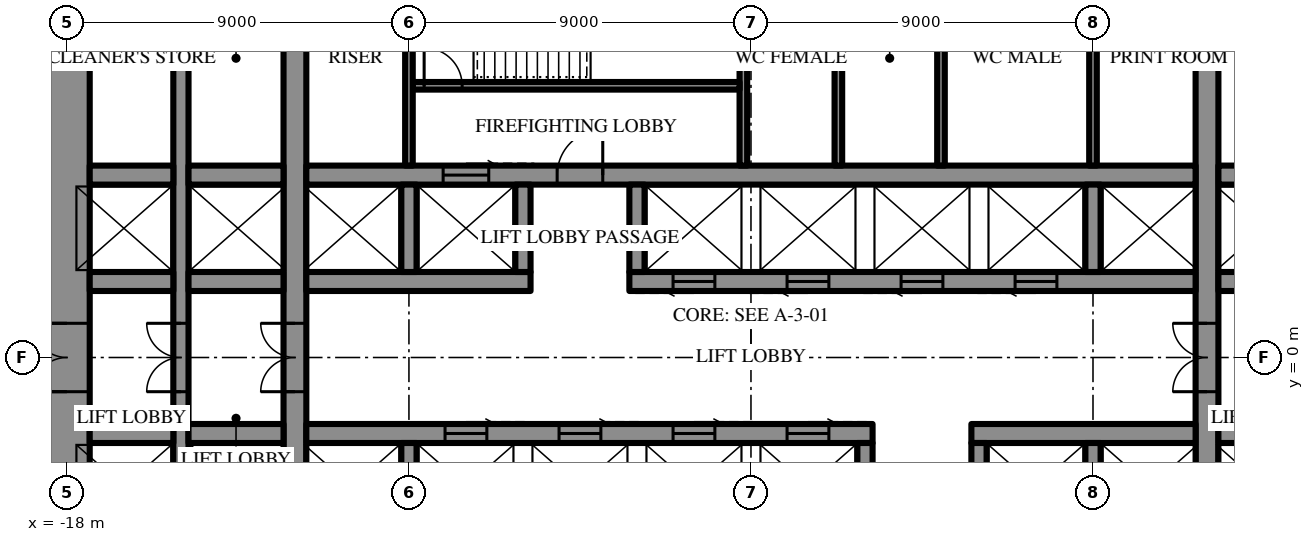
"""IFC4 building model, lengths in metres.
Left out: names, types, materials, properties, quantities, classifications, styles, units other than length and angle.
Written with IfcOpenShell. Run it as: python <this file> out.ifc"""

import sys

from ifc_helpers import new_model, si_unit, direction, frame, frame_2d, origin, place, context, subcontext, project, spatial, rectangle, extrude, element, fill, save


model = new_model("IFC4")
c1 = context("Model", 3, precision=1e-05, world=origin(), true_north=direction((0.0, 1.0)))
c2 = subcontext(c1, "Body", "Model", "MODEL_VIEW")
j1 = project(units=[si_unit("LENGTHUNIT", "METRE"), si_unit("PLANEANGLEUNIT", "RADIAN")], contexts=[c1])
p1 = place(None, origin())
s1 = spatial("IfcSite", under=j1, at=p1, CompositionType="ELEMENT")
p2 = place(p1, origin())
s2 = spatial("IfcBuilding", under=s1, at=p2, CompositionType="ELEMENT")
p3 = place(p2, frame((0.0, 0.0, 90.7)))
s3 = spatial("IfcBuildingStorey", under=s2, at=p3, CompositionType="ELEMENT", Elevation=90.7)
p4 = place(p3, frame((-18.0, 10.7, 0.0), z_axis=(0.0, 0.0, 1.0), x_axis=(0.0, -1.0, 0.0)))
e1 = element("IfcWall", 1, at=p4, inside=s3, PredefinedType="SHEAR", context=c2, shape_type="SweptSolid", body=[
    extrude(rectangle(XDim=21.4, YDim=1.2, at=frame_2d((10.7, 0.0))), origin(), (0.0, 0.0, 1.0), 4.2),
])
p5 = place(p4, frame((9.8, 0.0, 0.0)))
e2 = element("IfcOpeningElement", 2, at=p5, cuts=e1, PredefinedType="OPENING", context=c2, shape_type="SweptSolid", body=[
    extrude(rectangle(XDim=1.8, YDim=2.4, at=frame_2d((0.9, 1.2))), frame((0.0, 0.61, 0.0), z_axis=(0.0, -1.0, 0.0), x_axis=(1.0, 0.0, 0.0)), (0.0, 0.0, 1.0), 1.22),
])
p6 = place(p3, frame((12.0, -10.7, 0.0), z_axis=(0.0, 0.0, 1.0), x_axis=(0.0, 1.0, 0.0)))
e3 = element("IfcWall", 3, at=p6, inside=s3, PredefinedType="SHEAR", context=c2, shape_type="SweptSolid", body=[
    extrude(rectangle(XDim=21.4, YDim=0.6, at=frame_2d((10.7, 0.0))), origin(), (0.0, 0.0, 1.0), 4.2),
])
p7 = place(p6, frame((9.8, 0.0, 0.0)))
e4 = element("IfcOpeningElement", 4, at=p7, cuts=e3, PredefinedType="OPENING", context=c2, shape_type="SweptSolid", body=[
    extrude(rectangle(XDim=1.8, YDim=2.4, at=frame_2d((0.9, 1.2))), frame((0.0, 0.31, 0.0), z_axis=(0.0, -1.0, 0.0), x_axis=(1.0, 0.0, 0.0)), (0.0, 0.0, 1.0), 0.62),
])
p8 = place(p3, frame((-12.0, -10.7, 0.0), z_axis=(0.0, 0.0, 1.0), x_axis=(0.0, 1.0, 0.0)))
e5 = element("IfcWall", 5, at=p8, inside=s3, PredefinedType="SHEAR", context=c2, shape_type="SweptSolid", body=[
    extrude(rectangle(XDim=21.4, YDim=0.6, at=frame_2d((10.7, 0.0))), origin(), (0.0, 0.0, 1.0), 4.2),
])
p9 = place(p8, frame((9.8, 0.0, 0.0)))
e6 = element("IfcOpeningElement", 6, at=p9, cuts=e5, PredefinedType="OPENING", context=c2, shape_type="SweptSolid", body=[
    extrude(rectangle(XDim=1.8, YDim=2.4, at=frame_2d((0.9, 1.2))), frame((0.0, 0.31, 0.0), z_axis=(0.0, -1.0, 0.0), x_axis=(1.0, 0.0, 0.0)), (0.0, 0.0, 1.0), 0.62),
])
p10 = place(p3, frame((-15.0, -10.7, 0.0), z_axis=(0.0, 0.0, 1.0), x_axis=(0.0, 1.0, 0.0)))
e7 = element("IfcWall", 7, at=p10, inside=s3, PredefinedType="SHEAR", context=c2, shape_type="SweptSolid", body=[
    extrude(rectangle(XDim=21.4, YDim=0.4, at=frame_2d((10.7, 0.0))), origin(), (0.0, 0.0, 1.0), 4.2),
])
p11 = place(p10, frame((9.8, 0.0, 0.0)))
e8 = element("IfcOpeningElement", 8, at=p11, cuts=e7, PredefinedType="OPENING", context=c2, shape_type="SweptSolid", body=[
    extrude(rectangle(XDim=1.8, YDim=2.4, at=frame_2d((0.9, 1.2))), frame((0.0, 0.21, 0.0), z_axis=(0.0, -1.0, 0.0), x_axis=(1.0, 0.0, 0.0)), (0.0, 0.0, 1.0), 0.42),
])
p12 = place(p3, frame((-17.4, 2.0, 0.0), z_axis=(0.0, 0.0, 1.0), x_axis=(1.0, 0.0, 0.0)))
e9 = element("IfcWall", 9, at=p12, inside=s3, PredefinedType="SHEAR", context=c2, shape_type="SweptSolid", body=[
    extrude(rectangle(XDim=2.2, YDim=0.5, at=frame_2d((1.1, 0.0))), origin(), (0.0, 0.0, 1.0), 4.2),
])
p13 = place(p3, frame((-14.8, 2.0, 0.0), z_axis=(0.0, 0.0, 1.0), x_axis=(1.0, 0.0, 0.0)))
e10 = element("IfcWall", 10, at=p13, inside=s3, PredefinedType="SHEAR", context=c2, shape_type="SweptSolid", body=[
    extrude(rectangle(XDim=2.5, YDim=0.5, at=frame_2d((1.25, 0.0))), origin(), (0.0, 0.0, 1.0), 4.2),
])
p14 = place(p3, frame((-11.7, 2.0, 0.0), z_axis=(0.0, 0.0, 1.0), x_axis=(1.0, 0.0, 0.0)))
e11 = element("IfcWall", 11, at=p14, inside=s3, PredefinedType="SHEAR", context=c2, shape_type="SweptSolid", body=[
    extrude(rectangle(XDim=5.9, YDim=0.5, at=frame_2d((2.95, 0.0))), origin(), (0.0, 0.0, 1.0), 4.2),
])
p15 = place(p3, frame((-3.2, 2.0, 0.0), z_axis=(0.0, 0.0, 1.0), x_axis=(1.0, 0.0, 0.0)))
e12 = element("IfcWall", 12, at=p15, inside=s3, PredefinedType="SHEAR", context=c2, shape_type="SweptSolid", body=[
    extrude(rectangle(XDim=14.9, YDim=0.5, at=frame_2d((7.45, 0.0))), origin(), (0.0, 0.0, 1.0), 4.2),
])
p16 = place(p15, frame((1.15, 0.0, 0.0)))
e13 = element("IfcOpeningElement", 13, at=p16, cuts=e12, PredefinedType="OPENING", context=c2, shape_type="SweptSolid", body=[
    extrude(rectangle(XDim=1.1, YDim=2.2, at=frame_2d((0.55, 1.1))), frame((0.0, 0.26, 0.0), z_axis=(0.0, -1.0, 0.0), x_axis=(1.0, 0.0, 0.0)), (0.0, 0.0, 1.0), 0.52),
])
p17 = place(p15, frame((4.15, 0.0, 0.0)))
e14 = element("IfcOpeningElement", 14, at=p17, cuts=e12, PredefinedType="OPENING", context=c2, shape_type="SweptSolid", body=[
    extrude(rectangle(XDim=1.1, YDim=2.2, at=frame_2d((0.55, 1.1))), frame((0.0, 0.26, 0.0), z_axis=(0.0, -1.0, 0.0), x_axis=(1.0, 0.0, 0.0)), (0.0, 0.0, 1.0), 0.52),
])
p18 = place(p15, frame((7.15, 0.0, 0.0)))
e15 = element("IfcOpeningElement", 15, at=p18, cuts=e12, PredefinedType="OPENING", context=c2, shape_type="SweptSolid", body=[
    extrude(rectangle(XDim=1.1, YDim=2.2, at=frame_2d((0.55, 1.1))), frame((0.0, 0.26, 0.0), z_axis=(0.0, -1.0, 0.0), x_axis=(1.0, 0.0, 0.0)), (0.0, 0.0, 1.0), 0.52),
])
p19 = place(p15, frame((10.15, 0.0, 0.0)))
e16 = element("IfcOpeningElement", 16, at=p19, cuts=e12, PredefinedType="OPENING", context=c2, shape_type="SweptSolid", body=[
    extrude(rectangle(XDim=1.1, YDim=2.2, at=frame_2d((0.55, 1.1))), frame((0.0, 0.26, 0.0), z_axis=(0.0, -1.0, 0.0), x_axis=(1.0, 0.0, 0.0)), (0.0, 0.0, 1.0), 0.52),
])
p20 = place(p3, frame((12.3, 2.0, 0.0), z_axis=(0.0, 0.0, 1.0), x_axis=(1.0, 0.0, 0.0)))
e17 = element("IfcWall", 17, at=p20, inside=s3, PredefinedType="SHEAR", context=c2, shape_type="SweptSolid", body=[
    extrude(rectangle(XDim=2.5, YDim=0.5, at=frame_2d((1.25, 0.0))), origin(), (0.0, 0.0, 1.0), 4.2),
])
p21 = place(p3, frame((-17.4, 4.8, 0.0), z_axis=(0.0, 0.0, 1.0), x_axis=(1.0, 0.0, 0.0)))
e18 = element("IfcWall", 18, at=p21, inside=s3, PredefinedType="SHEAR", context=c2, shape_type="SweptSolid", body=[
    extrude(rectangle(XDim=2.2, YDim=0.5, at=frame_2d((1.1, 0.0))), origin(), (0.0, 0.0, 1.0), 4.2),
])
p22 = place(p3, frame((-14.8, 4.8, 0.0), z_axis=(0.0, 0.0, 1.0), x_axis=(1.0, 0.0, 0.0)))
e19 = element("IfcWall", 19, at=p22, inside=s3, PredefinedType="SHEAR", context=c2, shape_type="SweptSolid", body=[
    extrude(rectangle(XDim=2.5, YDim=0.5, at=frame_2d((1.25, 0.0))), origin(), (0.0, 0.0, 1.0), 4.2),
])
p23 = place(p3, frame((-11.7, 4.8, 0.0), z_axis=(0.0, 0.0, 1.0), x_axis=(1.0, 0.0, 0.0)))
e20 = element("IfcWall", 20, at=p23, inside=s3, PredefinedType="SHEAR", context=c2, shape_type="SweptSolid", body=[
    extrude(rectangle(XDim=23.4, YDim=0.5, at=frame_2d((11.7, 0.0))), origin(), (0.0, 0.0, 1.0), 4.2),
])
p24 = place(p23, frame((6.6, 0.0, 0.0)))
e21 = element("IfcOpeningElement", 21, at=p24, cuts=e20, PredefinedType="OPENING", context=c2, shape_type="SweptSolid", body=[
    extrude(rectangle(XDim=1.2, YDim=2.2, at=frame_2d((0.6, 1.1))), frame((0.0, 0.26, 0.0), z_axis=(0.0, -1.0, 0.0), x_axis=(1.0, 0.0, 0.0)), (0.0, 0.0, 1.0), 0.52),
])
p25 = place(p23, frame((3.6, 0.0, 0.0)))
e22 = element("IfcOpeningElement", 22, at=p25, cuts=e20, PredefinedType="OPENING", context=c2, shape_type="SweptSolid", body=[
    extrude(rectangle(XDim=1.2, YDim=2.2, at=frame_2d((0.6, 1.1))), frame((0.0, 0.26, 0.0), z_axis=(0.0, -1.0, 0.0), x_axis=(1.0, 0.0, 0.0)), (0.0, 0.0, 1.0), 0.52),
])
p26 = place(p3, frame((12.3, 4.8, 0.0), z_axis=(0.0, 0.0, 1.0), x_axis=(1.0, 0.0, 0.0)))
e23 = element("IfcWall", 23, at=p26, inside=s3, PredefinedType="SHEAR", context=c2, shape_type="SweptSolid", body=[
    extrude(rectangle(XDim=2.5, YDim=0.5, at=frame_2d((1.25, 0.0))), origin(), (0.0, 0.0, 1.0), 4.2),
])
for number, where, z_axis, x_axis in (
    (24, (-9.0, 2.25, 0.0), (0.0, 0.0, 1.0), (0.0, 1.0, 0.0)),
    (25, (-6.0, 2.25, 0.0), (0.0, 0.0, 1.0), (0.0, 1.0, 0.0)),
    (26, (-3.0, 2.25, 0.0), (0.0, 0.0, 1.0), (0.0, 1.0, 0.0)),
    (27, (9.0, 2.25, 0.0), (0.0, 0.0, 1.0), (0.0, 1.0, 0.0)),
):
    element("IfcWall", number, at=place(p3, frame(where, z_axis=z_axis, x_axis=x_axis)), inside=s3, PredefinedType="SHEAR", context=c2, shape_type="SweptSolid", body=[
        extrude(rectangle(XDim=2.3, YDim=0.4, at=frame_2d((1.15, 0.0))), origin(), (0.0, 0.0, 1.0), 4.2),
    ])
p27 = place(p3, frame((-0.2, 5.05, 0.0), z_axis=(0.0, 0.0, 1.0), x_axis=(0.0, 1.0, 0.0)))
e28 = element("IfcWall", 28, at=p27, inside=s3, PredefinedType="SHEAR", context=c2, shape_type="SweptSolid", body=[
    extrude(rectangle(XDim=5.65, YDim=0.2, at=frame_2d((2.825, 0.0))), origin(), (0.0, 0.0, 1.0), 4.2),
])
p28 = place(p3, frame((-8.9, 7.15, 0.0), z_axis=(0.0, 0.0, 1.0), x_axis=(1.0, 0.0, 0.0)))
e29 = element("IfcWall", 29, at=p28, inside=s3, PredefinedType="SHEAR", context=c2, shape_type="SweptSolid", body=[
    extrude(rectangle(XDim=8.6, YDim=0.2, at=frame_2d((4.3, 0.0))), origin(), (0.0, 0.0, 1.0), 4.2),
])
p29 = place(p28, frame((0.3, 0.0, 0.0)))
e30 = element("IfcOpeningElement", 30, at=p29, cuts=e29, PredefinedType="OPENING", context=c2, shape_type="SweptSolid", body=[
    extrude(rectangle(XDim=1.0, YDim=2.2, at=frame_2d((0.5, 1.1))), frame((0.0, 0.11, 0.0), z_axis=(0.0, -1.0, 0.0), x_axis=(1.0, 0.0, 0.0)), (0.0, 0.0, 1.0), 0.22),
])
p30 = place(p3, frame((14.8, -2.0, 0.0), z_axis=(0.0, 0.0, 1.0), x_axis=(-1.0, 0.0, 0.0)))
e31 = element("IfcWall", 31, at=p30, inside=s3, PredefinedType="SHEAR", context=c2, shape_type="SweptSolid", body=[
    extrude(rectangle(XDim=2.5, YDim=0.5, at=frame_2d((1.25, 0.0))), origin(), (0.0, 0.0, 1.0), 4.2),
])
p31 = place(p3, frame((11.7, -2.0, 0.0), z_axis=(0.0, 0.0, 1.0), x_axis=(-1.0, 0.0, 0.0)))
e32 = element("IfcWall", 32, at=p31, inside=s3, PredefinedType="SHEAR", context=c2, shape_type="SweptSolid", body=[
    extrude(rectangle(XDim=5.9, YDim=0.5, at=frame_2d((2.95, 0.0))), origin(), (0.0, 0.0, 1.0), 4.2),
])
p32 = place(p3, frame((3.2, -2.0, 0.0), z_axis=(0.0, 0.0, 1.0), x_axis=(-1.0, 0.0, 0.0)))
e33 = element("IfcWall", 33, at=p32, inside=s3, PredefinedType="SHEAR", context=c2, shape_type="SweptSolid", body=[
    extrude(rectangle(XDim=14.9, YDim=0.5, at=frame_2d((7.45, 0.0))), origin(), (0.0, 0.0, 1.0), 4.2),
])
p33 = place(p32, frame((1.15, 0.0, 0.0)))
e34 = element("IfcOpeningElement", 34, at=p33, cuts=e33, PredefinedType="OPENING", context=c2, shape_type="SweptSolid", body=[
    extrude(rectangle(XDim=1.1, YDim=2.2, at=frame_2d((0.55, 1.1))), frame((0.0, 0.26, 0.0), z_axis=(0.0, -1.0, 0.0), x_axis=(1.0, 0.0, 0.0)), (0.0, 0.0, 1.0), 0.52),
])
p34 = place(p32, frame((4.15, 0.0, 0.0)))
e35 = element("IfcOpeningElement", 35, at=p34, cuts=e33, PredefinedType="OPENING", context=c2, shape_type="SweptSolid", body=[
    extrude(rectangle(XDim=1.1, YDim=2.2, at=frame_2d((0.55, 1.1))), frame((0.0, 0.26, 0.0), z_axis=(0.0, -1.0, 0.0), x_axis=(1.0, 0.0, 0.0)), (0.0, 0.0, 1.0), 0.52),
])
p35 = place(p32, frame((7.15, 0.0, 0.0)))
e36 = element("IfcOpeningElement", 36, at=p35, cuts=e33, PredefinedType="OPENING", context=c2, shape_type="SweptSolid", body=[
    extrude(rectangle(XDim=1.1, YDim=2.2, at=frame_2d((0.55, 1.1))), frame((0.0, 0.26, 0.0), z_axis=(0.0, -1.0, 0.0), x_axis=(1.0, 0.0, 0.0)), (0.0, 0.0, 1.0), 0.52),
])
p36 = place(p32, frame((10.15, 0.0, 0.0)))
e37 = element("IfcOpeningElement", 37, at=p36, cuts=e33, PredefinedType="OPENING", context=c2, shape_type="SweptSolid", body=[
    extrude(rectangle(XDim=1.1, YDim=2.2, at=frame_2d((0.55, 1.1))), frame((0.0, 0.26, 0.0), z_axis=(0.0, -1.0, 0.0), x_axis=(1.0, 0.0, 0.0)), (0.0, 0.0, 1.0), 0.52),
])
p37 = place(p3, frame((-12.3, -2.0, 0.0), z_axis=(0.0, 0.0, 1.0), x_axis=(-1.0, 0.0, 0.0)))
e38 = element("IfcWall", 38, at=p37, inside=s3, PredefinedType="SHEAR", context=c2, shape_type="SweptSolid", body=[
    extrude(rectangle(XDim=2.5, YDim=0.5, at=frame_2d((1.25, 0.0))), origin(), (0.0, 0.0, 1.0), 4.2),
])
p38 = place(p3, frame((-15.2, -2.0, 0.0), z_axis=(0.0, 0.0, 1.0), x_axis=(-1.0, 0.0, 0.0)))
e39 = element("IfcWall", 39, at=p38, inside=s3, PredefinedType="SHEAR", context=c2, shape_type="SweptSolid", body=[
    extrude(rectangle(XDim=2.2, YDim=0.5, at=frame_2d((1.1, 0.0))), origin(), (0.0, 0.0, 1.0), 4.2),
])
for number, where, z_axis, x_axis in (
    (40, (9.0, -2.25, 0.0), (0.0, 0.0, 1.0), (0.0, -1.0, 0.0)),
    (41, (6.0, -2.25, 0.0), (0.0, 0.0, 1.0), (0.0, -1.0, 0.0)),
    (42, (3.0, -2.25, 0.0), (0.0, 0.0, 1.0), (0.0, -1.0, 0.0)),
    (43, (-9.0, -2.25, 0.0), (0.0, 0.0, 1.0), (0.0, -1.0, 0.0)),
):
    element("IfcWall", number, at=place(p3, frame(where, z_axis=z_axis, x_axis=x_axis)), inside=s3, PredefinedType="SHEAR", context=c2, shape_type="SweptSolid", body=[
        extrude(rectangle(XDim=2.3, YDim=0.4, at=frame_2d((1.15, 0.0))), origin(), (0.0, 0.0, 1.0), 4.2),
    ])
for number, where, z_axis, x_axis in (
    (44, (-9.0, 5.05, 0.0), (0.0, 0.0, 1.0), (0.0, 1.0, 0.0)),
    (45, (9.0, 5.05, 0.0), (0.0, 0.0, 1.0), (0.0, 1.0, 0.0)),
    (46, (2.3, 5.05, 0.0), (0.0, 0.0, 1.0), (0.0, 1.0, 0.0)),
    (47, (5.0, 5.05, 0.0), (0.0, 0.0, 1.0), (0.0, 1.0, 0.0)),
):
    element("IfcWall", number, at=place(p3, frame(where, z_axis=z_axis, x_axis=x_axis)), inside=s3, PredefinedType="PARTITIONING", context=c2, shape_type="SweptSolid", body=[
        extrude(rectangle(XDim=5.65, YDim=0.2, at=frame_2d((2.825, 0.0))), origin(), (0.0, 0.0, 1.0), 4.0),
    ])
p39 = place(p5, frame((1.8, 0.0, 0.0), z_axis=(0.0, 0.0, 1.0), x_axis=(-1.0, 0.0, 0.0)))
e48 = element("IfcDoor", 48, at=p39, inside=s3, OperationType="DOUBLE_DOOR_SINGLE_SWING", PredefinedType="DOOR", context=c2, shape_type="SweptSolid", body=[
    extrude(rectangle(XDim=1.8, YDim=2.4, at=frame_2d((0.9, 1.2))), frame((0.0, 0.025, 0.0), z_axis=(0.0, -1.0, 0.0), x_axis=(1.0, 0.0, 0.0)), (0.0, 0.0, 1.0), 0.05),
])
fill(e2, e48)
p40 = place(p24, origin())
e49 = element("IfcDoor", 49, at=p40, inside=s3, OperationType="SINGLE_SWING_LEFT", PredefinedType="DOOR", context=c2, shape_type="SweptSolid", body=[
    extrude(rectangle(XDim=1.2, YDim=2.2, at=frame_2d((0.6, 1.1))), frame((0.0, 0.025, 0.0), z_axis=(0.0, -1.0, 0.0), x_axis=(1.0, 0.0, 0.0)), (0.0, 0.0, 1.0), 0.05),
])
fill(e21, e49)
p41 = place(p29, origin())
e50 = element("IfcDoor", 50, at=p41, inside=s3, OperationType="SINGLE_SWING_RIGHT", PredefinedType="DOOR", context=c2, shape_type="SweptSolid", body=[
    extrude(rectangle(XDim=1.0, YDim=2.2, at=frame_2d((0.5, 1.1))), frame((0.0, 0.025, 0.0), z_axis=(0.0, -1.0, 0.0), x_axis=(1.0, 0.0, 0.0)), (0.0, 0.0, 1.0), 0.05),
])
fill(e30, e50)
p42 = place(p7, origin())
e51 = element("IfcDoor", 51, at=p42, inside=s3, OperationType="DOUBLE_DOOR_SINGLE_SWING", PredefinedType="DOOR", context=c2, shape_type="SweptSolid", body=[
    extrude(rectangle(XDim=1.8, YDim=2.4, at=frame_2d((0.9, 1.2))), frame((0.0, 0.025, 0.0), z_axis=(0.0, -1.0, 0.0), x_axis=(1.0, 0.0, 0.0)), (0.0, 0.0, 1.0), 0.05),
])
fill(e4, e51)
p43 = place(p9, origin())
e52 = element("IfcDoor", 52, at=p43, inside=s3, OperationType="DOUBLE_DOOR_SINGLE_SWING", PredefinedType="DOOR", context=c2, shape_type="SweptSolid", body=[
    extrude(rectangle(XDim=1.8, YDim=2.4, at=frame_2d((0.9, 1.2))), frame((0.0, 0.025, 0.0), z_axis=(0.0, -1.0, 0.0), x_axis=(1.0, 0.0, 0.0)), (0.0, 0.0, 1.0), 0.05),
])
fill(e6, e52)
p44 = place(p11, origin())
e53 = element("IfcDoor", 53, at=p44, inside=s3, OperationType="DOUBLE_DOOR_SINGLE_SWING", PredefinedType="DOOR", context=c2, shape_type="SweptSolid", body=[
    extrude(rectangle(XDim=1.8, YDim=2.4, at=frame_2d((0.9, 1.2))), frame((0.0, 0.025, 0.0), z_axis=(0.0, -1.0, 0.0), x_axis=(1.0, 0.0, 0.0)), (0.0, 0.0, 1.0), 0.05),
])
fill(e8, e53)
p45 = place(p25, origin())
e54 = element("IfcDoor", 54, at=p45, inside=s3, OperationType="SLIDING_TO_LEFT", PredefinedType="DOOR", context=c2, shape_type="SweptSolid", body=[
    extrude(rectangle(XDim=1.2, YDim=2.2, at=frame_2d((0.6, 1.1))), frame((0.0, 0.025, 0.0), z_axis=(0.0, -1.0, 0.0), x_axis=(1.0, 0.0, 0.0)), (0.0, 0.0, 1.0), 0.05),
])
fill(e22, e54)
p46 = place(p16, frame((1.1, 0.0, 0.0), z_axis=(0.0, 0.0, 1.0), x_axis=(-1.0, 0.0, 0.0)))
e55 = element("IfcDoor", 55, at=p46, inside=s3, OperationType="SLIDING_TO_LEFT", PredefinedType="DOOR", context=c2, shape_type="SweptSolid", body=[
    extrude(rectangle(XDim=1.1, YDim=2.2, at=frame_2d((0.55, 1.1))), frame((0.0, 0.025, 0.0), z_axis=(0.0, -1.0, 0.0), x_axis=(1.0, 0.0, 0.0)), (0.0, 0.0, 1.0), 0.05),
])
fill(e13, e55)
p47 = place(p17, frame((1.1, 0.0, 0.0), z_axis=(0.0, 0.0, 1.0), x_axis=(-1.0, 0.0, 0.0)))
e56 = element("IfcDoor", 56, at=p47, inside=s3, OperationType="SLIDING_TO_LEFT", PredefinedType="DOOR", context=c2, shape_type="SweptSolid", body=[
    extrude(rectangle(XDim=1.1, YDim=2.2, at=frame_2d((0.55, 1.1))), frame((0.0, 0.025, 0.0), z_axis=(0.0, -1.0, 0.0), x_axis=(1.0, 0.0, 0.0)), (0.0, 0.0, 1.0), 0.05),
])
fill(e14, e56)
p48 = place(p18, frame((1.1, 0.0, 0.0), z_axis=(0.0, 0.0, 1.0), x_axis=(-1.0, 0.0, 0.0)))
e57 = element("IfcDoor", 57, at=p48, inside=s3, OperationType="SLIDING_TO_LEFT", PredefinedType="DOOR", context=c2, shape_type="SweptSolid", body=[
    extrude(rectangle(XDim=1.1, YDim=2.2, at=frame_2d((0.55, 1.1))), frame((0.0, 0.025, 0.0), z_axis=(0.0, -1.0, 0.0), x_axis=(1.0, 0.0, 0.0)), (0.0, 0.0, 1.0), 0.05),
])
fill(e15, e57)
p49 = place(p19, frame((1.1, 0.0, 0.0), z_axis=(0.0, 0.0, 1.0), x_axis=(-1.0, 0.0, 0.0)))
e58 = element("IfcDoor", 58, at=p49, inside=s3, OperationType="SLIDING_TO_LEFT", PredefinedType="DOOR", context=c2, shape_type="SweptSolid", body=[
    extrude(rectangle(XDim=1.1, YDim=2.2, at=frame_2d((0.55, 1.1))), frame((0.0, 0.025, 0.0), z_axis=(0.0, -1.0, 0.0), x_axis=(1.0, 0.0, 0.0)), (0.0, 0.0, 1.0), 0.05),
])
fill(e16, e58)
p50 = place(p33, frame((1.1, 0.0, 0.0), z_axis=(0.0, 0.0, 1.0), x_axis=(-1.0, 0.0, 0.0)))
e59 = element("IfcDoor", 59, at=p50, inside=s3, OperationType="SLIDING_TO_LEFT", PredefinedType="DOOR", context=c2, shape_type="SweptSolid", body=[
    extrude(rectangle(XDim=1.1, YDim=2.2, at=frame_2d((0.55, 1.1))), frame((0.0, 0.025, 0.0), z_axis=(0.0, -1.0, 0.0), x_axis=(1.0, 0.0, 0.0)), (0.0, 0.0, 1.0), 0.05),
])
fill(e34, e59)
p51 = place(p34, frame((1.1, 0.0, 0.0), z_axis=(0.0, 0.0, 1.0), x_axis=(-1.0, 0.0, 0.0)))
e60 = element("IfcDoor", 60, at=p51, inside=s3, OperationType="SLIDING_TO_LEFT", PredefinedType="DOOR", context=c2, shape_type="SweptSolid", body=[
    extrude(rectangle(XDim=1.1, YDim=2.2, at=frame_2d((0.55, 1.1))), frame((0.0, 0.025, 0.0), z_axis=(0.0, -1.0, 0.0), x_axis=(1.0, 0.0, 0.0)), (0.0, 0.0, 1.0), 0.05),
])
fill(e35, e60)
p52 = place(p35, frame((1.1, 0.0, 0.0), z_axis=(0.0, 0.0, 1.0), x_axis=(-1.0, 0.0, 0.0)))
e61 = element("IfcDoor", 61, at=p52, inside=s3, OperationType="SLIDING_TO_LEFT", PredefinedType="DOOR", context=c2, shape_type="SweptSolid", body=[
    extrude(rectangle(XDim=1.1, YDim=2.2, at=frame_2d((0.55, 1.1))), frame((0.0, 0.025, 0.0), z_axis=(0.0, -1.0, 0.0), x_axis=(1.0, 0.0, 0.0)), (0.0, 0.0, 1.0), 0.05),
])
fill(e36, e61)
p53 = place(p36, frame((1.1, 0.0, 0.0), z_axis=(0.0, 0.0, 1.0), x_axis=(-1.0, 0.0, 0.0)))
e62 = element("IfcDoor", 62, at=p53, inside=s3, OperationType="SLIDING_TO_LEFT", PredefinedType="DOOR", context=c2, shape_type="SweptSolid", body=[
    extrude(rectangle(XDim=1.1, YDim=2.2, at=frame_2d((0.55, 1.1))), frame((0.0, 0.025, 0.0), z_axis=(0.0, -1.0, 0.0), x_axis=(1.0, 0.0, 0.0)), (0.0, 0.0, 1.0), 0.05),
])
fill(e37, e62)
save(model, sys.argv[1])
